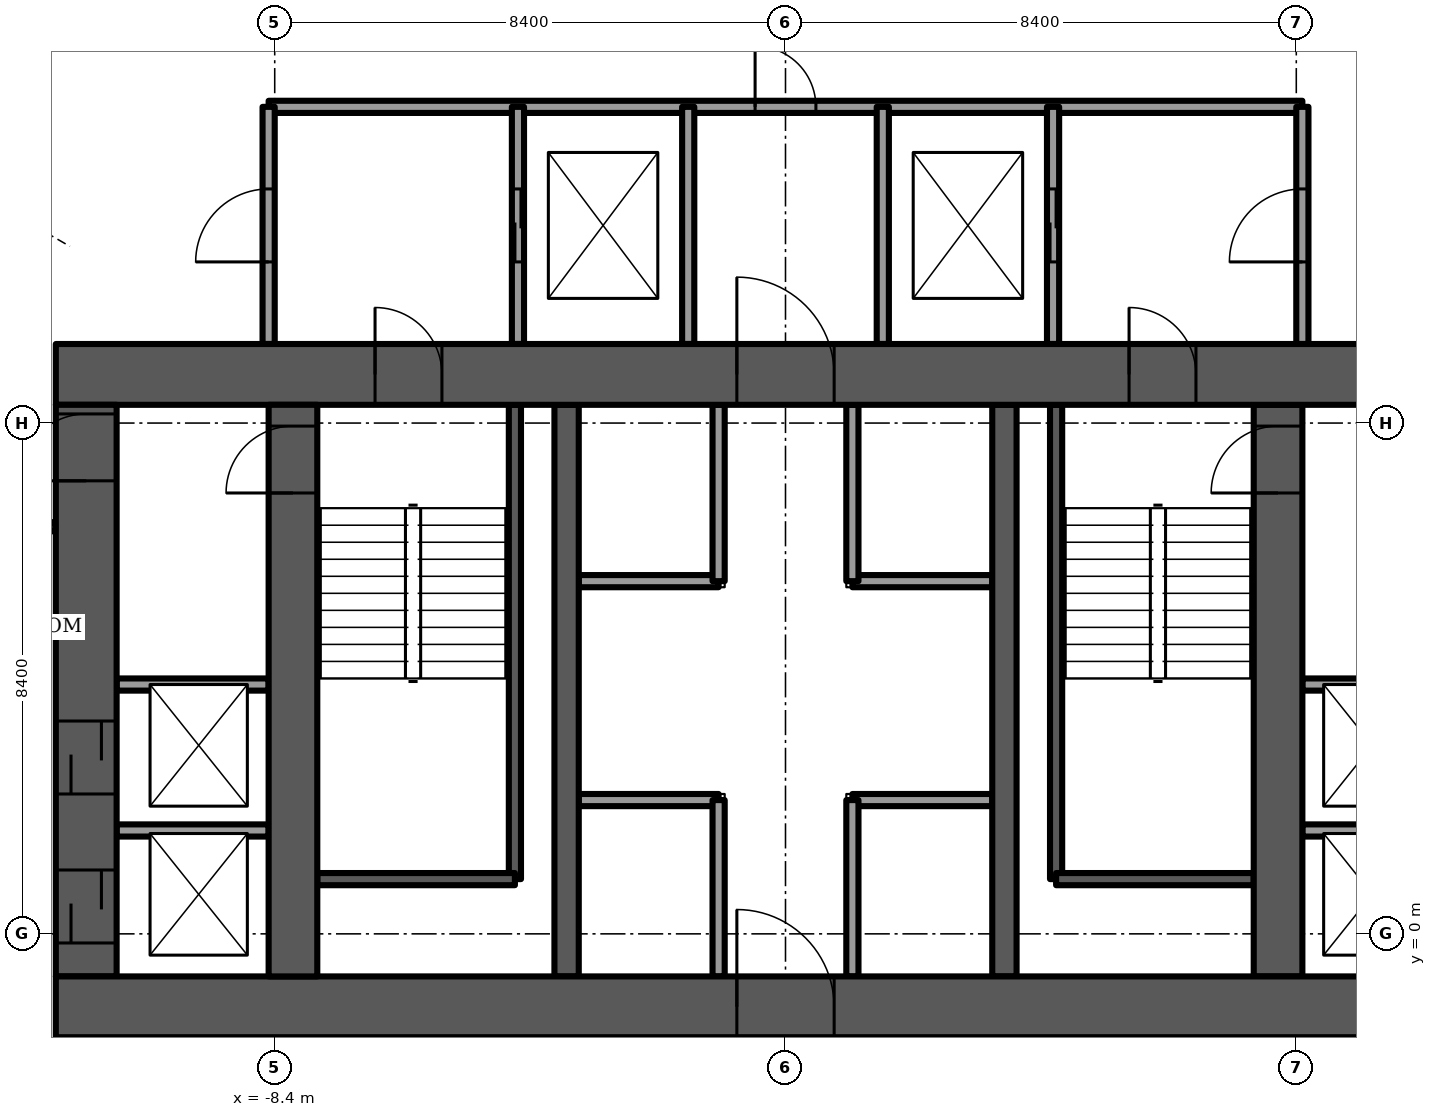
"""IFC4 building model, lengths in metres.
Left out: names, types, materials, properties, quantities, classifications, styles, units other than length and angle.
Written with IfcOpenShell. Run it as: python <this file> out.ifc"""

import sys

from ifc_helpers import new_model, si_unit, direction, frame, frame_2d, origin, place, context, subcontext, project, spatial, rectangle, extrude, element, fill, save


model = new_model("IFC4")
c1 = context("Model", 3, precision=1e-05, world=origin(), true_north=direction((0.0, 1.0)))
c2 = subcontext(c1, "Body", "Model", "MODEL_VIEW")
j1 = project(units=[si_unit("LENGTHUNIT", "METRE"), si_unit("PLANEANGLEUNIT", "RADIAN")], contexts=[c1])
p1 = place(None, origin())
s1 = spatial("IfcSite", under=j1, at=p1, CompositionType="ELEMENT")
p2 = place(p1, origin())
s2 = spatial("IfcBuilding", under=s1, at=p2, CompositionType="ELEMENT")
p3 = place(p2, frame((0.0, 0.0, 138.5)))
s3 = spatial("IfcBuildingStorey", under=s2, at=p3, CompositionType="ELEMENT", Elevation=138.5)
p4 = place(p3, frame((-12.0, -1.2, -0.3), z_axis=(0.0, 0.0, 1.0), x_axis=(1.0, 0.0, 0.0)))
e1 = element("IfcWall", 1, at=p4, inside=s3, PredefinedType="SHEAR", context=c2, shape_type="SweptSolid", body=[
    extrude(rectangle(XDim=24.0, YDim=1.0, at=frame_2d((12.0, 0.0))), origin(), (0.0, 0.0, 1.0), 3.75),
])
p5 = place(p4, frame((11.2, 0.0, 0.0)))
e2 = element("IfcOpeningElement", 2, at=p5, cuts=e1, PredefinedType="OPENING", context=c2, shape_type="SweptSolid", body=[
    extrude(rectangle(XDim=1.6, YDim=2.1, at=frame_2d((0.8, 1.05))), frame((0.0, 0.5, 0.0), z_axis=(0.0, -1.0, 0.0), x_axis=(1.0, 0.0, 0.0)), (0.0, 0.0, 1.0), 1.0),
])
p6 = place(p3, frame((-12.0, 9.2, -0.3), z_axis=(0.0, 0.0, 1.0), x_axis=(1.0, 0.0, 0.0)))
e3 = element("IfcWall", 3, at=p6, inside=s3, PredefinedType="SHEAR", context=c2, shape_type="SweptSolid", body=[
    extrude(rectangle(XDim=24.0, YDim=1.0, at=frame_2d((12.0, 0.0))), origin(), (0.0, 0.0, 1.0), 3.75),
])
p7 = place(p6, frame((11.2, 0.0, 0.0)))
e4 = element("IfcOpeningElement", 4, at=p7, cuts=e3, PredefinedType="OPENING", context=c2, shape_type="SweptSolid", body=[
    extrude(rectangle(XDim=1.6, YDim=2.1, at=frame_2d((0.8, 1.05))), frame((0.0, 0.5, 0.0), z_axis=(0.0, -1.0, 0.0), x_axis=(1.0, 0.0, 0.0)), (0.0, 0.0, 1.0), 1.0),
])
p8 = place(p6, frame((5.25, 0.0, 0.0)))
e5 = element("IfcOpeningElement", 5, at=p8, cuts=e3, PredefinedType="OPENING", context=c2, shape_type="SweptSolid", body=[
    extrude(rectangle(XDim=1.1, YDim=2.1, at=frame_2d((0.55, 1.05))), frame((0.0, 0.5, 0.0), z_axis=(0.0, -1.0, 0.0), x_axis=(1.0, 0.0, 0.0)), (0.0, 0.0, 1.0), 1.0),
])
p9 = place(p6, frame((17.65, 0.0, 0.0)))
e6 = element("IfcOpeningElement", 6, at=p9, cuts=e3, PredefinedType="OPENING", context=c2, shape_type="SweptSolid", body=[
    extrude(rectangle(XDim=1.1, YDim=2.1, at=frame_2d((0.55, 1.05))), frame((0.0, 0.5, 0.0), z_axis=(0.0, -1.0, 0.0), x_axis=(1.0, 0.0, 0.0)), (0.0, 0.0, 1.0), 1.0),
])
p10 = place(p3, frame((-8.1, -0.7, -0.3), z_axis=(0.0, 0.0, 1.0), x_axis=(0.0, 1.0, 0.0)))
e7 = element("IfcWall", 7, at=p10, inside=s3, PredefinedType="SHEAR", context=c2, shape_type="SweptSolid", body=[
    extrude(rectangle(XDim=9.4, YDim=0.8, at=frame_2d((4.7, 0.0))), origin(), (0.0, 0.0, 1.0), 3.75),
])
p11 = place(p10, frame((7.95, 0.0, 0.0)))
e8 = element("IfcOpeningElement", 8, at=p11, cuts=e7, PredefinedType="OPENING", context=c2, shape_type="SweptSolid", body=[
    extrude(rectangle(XDim=1.1, YDim=2.1, at=frame_2d((0.55, 1.05))), frame((0.0, 0.4, 0.0), z_axis=(0.0, -1.0, 0.0), x_axis=(1.0, 0.0, 0.0)), (0.0, 0.0, 1.0), 0.8),
])
p12 = place(p3, frame((8.1, -0.7, -0.3), z_axis=(0.0, 0.0, 1.0), x_axis=(0.0, 1.0, 0.0)))
e9 = element("IfcWall", 9, at=p12, inside=s3, PredefinedType="SHEAR", context=c2, shape_type="SweptSolid", body=[
    extrude(rectangle(XDim=9.4, YDim=0.8, at=frame_2d((4.7, 0.0))), origin(), (0.0, 0.0, 1.0), 3.75),
])
p13 = place(p12, frame((7.95, 0.0, 0.0)))
e10 = element("IfcOpeningElement", 10, at=p13, cuts=e9, PredefinedType="OPENING", context=c2, shape_type="SweptSolid", body=[
    extrude(rectangle(XDim=1.1, YDim=2.1, at=frame_2d((0.55, 1.05))), frame((0.0, 0.4, 0.0), z_axis=(0.0, -1.0, 0.0), x_axis=(1.0, 0.0, 0.0)), (0.0, 0.0, 1.0), 0.8),
])
for number, where, z_axis, x_axis in (
    (11, (-3.6, -0.7, -0.3), (0.0, 0.0, 1.0), (0.0, 1.0, 0.0)),
    (12, (3.6, -0.7, -0.3), (0.0, 0.0, 1.0), (0.0, 1.0, 0.0)),
):
    element("IfcWall", number, at=place(p3, frame(where, z_axis=z_axis, x_axis=x_axis)), inside=s3, PredefinedType="SHEAR", context=c2, shape_type="SweptSolid", body=[
        extrude(rectangle(XDim=9.4, YDim=0.4, at=frame_2d((4.7, 0.0))), origin(), (0.0, 0.0, 1.0), 3.75),
    ])
p14 = place(p3, frame((-11.5, -0.7, -0.3), z_axis=(0.0, 0.0, 1.0), x_axis=(0.0, 1.0, 0.0)))
e13 = element("IfcWall", 13, at=p14, inside=s3, PredefinedType="SHEAR", context=c2, shape_type="SweptSolid", body=[
    extrude(rectangle(XDim=9.4, YDim=1.0, at=frame_2d((4.7, 0.0))), origin(), (0.0, 0.0, 1.0), 3.75),
])
p15 = place(p14, frame((8.15, 0.0, 0.0)))
e14 = element("IfcOpeningElement", 14, at=p15, cuts=e13, PredefinedType="OPENING", context=c2, shape_type="SweptSolid", body=[
    extrude(rectangle(XDim=1.1, YDim=2.1, at=frame_2d((0.55, 1.05))), frame((0.0, 0.5, 0.0), z_axis=(0.0, -1.0, 0.0), x_axis=(1.0, 0.0, 0.0)), (0.0, 0.0, 1.0), 1.0),
])
p16 = place(p14, frame((0.55, 0.0, 0.0)))
e15 = element("IfcOpeningElement", 15, at=p16, cuts=e13, PredefinedType="OPENING", context=c2, shape_type="SweptSolid", body=[
    extrude(rectangle(XDim=1.2, YDim=2.1, at=frame_2d((0.6, 1.05))), frame((0.0, 0.5, 0.0), z_axis=(0.0, -1.0, 0.0), x_axis=(1.0, 0.0, 0.0)), (0.0, 0.0, 1.0), 1.0),
])
p17 = place(p14, frame((3.0, 0.0, 0.0)))
e16 = element("IfcOpeningElement", 16, at=p17, cuts=e13, PredefinedType="OPENING", context=c2, shape_type="SweptSolid", body=[
    extrude(rectangle(XDim=1.2, YDim=2.1, at=frame_2d((0.6, 1.05))), frame((0.0, 0.5, 0.0), z_axis=(0.0, -1.0, 0.0), x_axis=(1.0, 0.0, 0.0)), (0.0, 0.0, 1.0), 1.0),
])
p18 = place(p3, frame((-10.45, 19.286, 0.0), z_axis=(0.0, 0.0, 1.0), x_axis=(-0.499991127072, -0.866030526511, 0.0)))
e17 = element("IfcWall", 17, at=p18, inside=s3, PredefinedType="PARAPET", context=c2, shape_type="SweptSolid", body=[
    extrude(rectangle(XDim=7.001, YDim=0.9, at=frame_2d((3.5, 0.0))), origin(), (0.0, 0.0, 1.0), 1.1),
])
for number, where, z_axis, x_axis in (
    (18, (-3.4, 2.2, 0.0), (0.0, 0.0, 1.0), (1.0, 0.0, 0.0)),
    (19, (-3.4, 5.8, 0.0), (0.0, 0.0, 1.0), (1.0, 0.0, 0.0)),
    (20, (1.1, 2.2, 0.0), (0.0, 0.0, 1.0), (1.0, 0.0, 0.0)),
    (21, (1.1, 5.8, 0.0), (0.0, 0.0, 1.0), (1.0, 0.0, 0.0)),
):
    element("IfcWall", number, at=place(p3, frame(where, z_axis=z_axis, x_axis=x_axis)), inside=s3, PredefinedType="PARTITIONING", context=c2, shape_type="SweptSolid", body=[
        extrude(rectangle(XDim=2.3, YDim=0.2, at=frame_2d((1.15, 0.0))), origin(), (0.0, 0.0, 1.0), 3.45),
    ])
for number, where, z_axis, x_axis in (
    (22, (-1.1, -0.7, 0.0), (0.0, 0.0, 1.0), (0.0, 1.0, 0.0)),
    (23, (1.1, -0.7, 0.0), (0.0, 0.0, 1.0), (0.0, 1.0, 0.0)),
    (24, (-1.1, 5.8, 0.0), (0.0, 0.0, 1.0), (0.0, 1.0, 0.0)),
    (25, (1.1, 5.8, 0.0), (0.0, 0.0, 1.0), (0.0, 1.0, 0.0)),
):
    element("IfcWall", number, at=place(p3, frame(where, z_axis=z_axis, x_axis=x_axis)), inside=s3, PredefinedType="PARTITIONING", context=c2, shape_type="SweptSolid", body=[
        extrude(rectangle(XDim=2.9, YDim=0.2, at=frame_2d((1.45, 0.0))), origin(), (0.0, 0.0, 1.0), 3.45),
    ])
p19 = place(p3, frame((-4.45, 0.9, -0.3), z_axis=(0.0, 0.0, 1.0), x_axis=(0.0, 1.0, 0.0)))
e26 = element("IfcWall", 26, at=p19, inside=s3, PredefinedType="SOLIDWALL", context=c2, shape_type="SweptSolid", body=[
    extrude(rectangle(XDim=7.8, YDim=0.2, at=frame_2d((3.9, 0.0))), origin(), (0.0, 0.0, 1.0), 3.75),
])
p20 = place(p3, frame((-7.7, 0.9, -0.3), z_axis=(0.0, 0.0, 1.0), x_axis=(1.0, 0.0, 0.0)))
e27 = element("IfcWall", 27, at=p20, inside=s3, PredefinedType="SOLIDWALL", context=c2, shape_type="SweptSolid", body=[
    extrude(rectangle(XDim=3.25, YDim=0.2, at=frame_2d((1.625, 0.0))), origin(), (0.0, 0.0, 1.0), 3.75),
])
p21 = place(p3, frame((4.45, 0.9, -0.3), z_axis=(0.0, 0.0, 1.0), x_axis=(0.0, 1.0, 0.0)))
e28 = element("IfcWall", 28, at=p21, inside=s3, PredefinedType="SOLIDWALL", context=c2, shape_type="SweptSolid", body=[
    extrude(rectangle(XDim=7.8, YDim=0.2, at=frame_2d((3.9, 0.0))), origin(), (0.0, 0.0, 1.0), 3.75),
])
p22 = place(p3, frame((4.45, 0.9, -0.3), z_axis=(0.0, 0.0, 1.0), x_axis=(1.0, 0.0, 0.0)))
e29 = element("IfcWall", 29, at=p22, inside=s3, PredefinedType="SOLIDWALL", context=c2, shape_type="SweptSolid", body=[
    extrude(rectangle(XDim=3.25, YDim=0.2, at=frame_2d((1.625, 0.0))), origin(), (0.0, 0.0, 1.0), 3.75),
])
p23 = place(p3, frame((-8.5, 13.6, 0.0), z_axis=(0.0, 0.0, 1.0), x_axis=(1.0, 0.0, 0.0)))
e30 = element("IfcWall", 30, at=p23, inside=s3, PredefinedType="PARTITIONING", context=c2, shape_type="SweptSolid", body=[
    extrude(rectangle(XDim=17.0, YDim=0.2, at=frame_2d((8.5, 0.0))), origin(), (0.0, 0.0, 1.0), 3.45),
])
p24 = place(p23, frame((8.0, 0.0, 0.0)))
e31 = element("IfcOpeningElement", 31, at=p24, cuts=e30, PredefinedType="OPENING", context=c2, shape_type="SweptSolid", body=[
    extrude(rectangle(XDim=1.0, YDim=2.1, at=frame_2d((0.5, 1.05))), frame((0.0, 0.1, 0.0), z_axis=(0.0, -1.0, 0.0), x_axis=(1.0, 0.0, 0.0)), (0.0, 0.0, 1.0), 0.2),
])
p25 = place(p3, frame((-8.5, 9.7, 0.0), z_axis=(0.0, 0.0, 1.0), x_axis=(0.0, 1.0, 0.0)))
e32 = element("IfcWall", 32, at=p25, inside=s3, PredefinedType="PARTITIONING", context=c2, shape_type="SweptSolid", body=[
    extrude(rectangle(XDim=3.9, YDim=0.2, at=frame_2d((1.95, 0.0))), origin(), (0.0, 0.0, 1.0), 3.45),
])
p26 = place(p25, frame((1.35, 0.0, 0.0)))
e33 = element("IfcOpeningElement", 33, at=p26, cuts=e32, PredefinedType="OPENING", context=c2, shape_type="SweptSolid", body=[
    extrude(rectangle(XDim=1.2, YDim=2.1, at=frame_2d((0.6, 1.05))), frame((0.0, 0.1, 0.0), z_axis=(0.0, -1.0, 0.0), x_axis=(1.0, 0.0, 0.0)), (0.0, 0.0, 1.0), 0.2),
])
p27 = place(p3, frame((8.5, 9.7, 0.0), z_axis=(0.0, 0.0, 1.0), x_axis=(0.0, 1.0, 0.0)))
e34 = element("IfcWall", 34, at=p27, inside=s3, PredefinedType="PARTITIONING", context=c2, shape_type="SweptSolid", body=[
    extrude(rectangle(XDim=3.9, YDim=0.2, at=frame_2d((1.95, 0.0))), origin(), (0.0, 0.0, 1.0), 3.45),
])
p28 = place(p27, frame((1.35, 0.0, 0.0)))
e35 = element("IfcOpeningElement", 35, at=p28, cuts=e34, PredefinedType="OPENING", context=c2, shape_type="SweptSolid", body=[
    extrude(rectangle(XDim=1.2, YDim=2.1, at=frame_2d((0.6, 1.05))), frame((0.0, 0.1, 0.0), z_axis=(0.0, -1.0, 0.0), x_axis=(1.0, 0.0, 0.0)), (0.0, 0.0, 1.0), 0.2),
])
p29 = place(p3, frame((-4.4, 9.7, 0.0), z_axis=(0.0, 0.0, 1.0), x_axis=(0.0, 1.0, 0.0)))
e36 = element("IfcWall", 36, at=p29, inside=s3, PredefinedType="PARTITIONING", context=c2, shape_type="SweptSolid", body=[
    extrude(rectangle(XDim=3.9, YDim=0.2, at=frame_2d((1.95, 0.0))), origin(), (0.0, 0.0, 1.0), 3.45),
])
p30 = place(p29, frame((1.35, 0.0, 0.0)))
e37 = element("IfcOpeningElement", 37, at=p30, cuts=e36, PredefinedType="OPENING", context=c2, shape_type="SweptSolid", body=[
    extrude(rectangle(XDim=1.2, YDim=2.1, at=frame_2d((0.6, 1.05))), frame((0.0, 0.1, 0.0), z_axis=(0.0, -1.0, 0.0), x_axis=(1.0, 0.0, 0.0)), (0.0, 0.0, 1.0), 0.2),
])
p31 = place(p3, frame((4.4, 9.7, 0.0), z_axis=(0.0, 0.0, 1.0), x_axis=(0.0, 1.0, 0.0)))
e38 = element("IfcWall", 38, at=p31, inside=s3, PredefinedType="PARTITIONING", context=c2, shape_type="SweptSolid", body=[
    extrude(rectangle(XDim=3.9, YDim=0.2, at=frame_2d((1.95, 0.0))), origin(), (0.0, 0.0, 1.0), 3.45),
])
p32 = place(p31, frame((1.35, 0.0, 0.0)))
e39 = element("IfcOpeningElement", 39, at=p32, cuts=e38, PredefinedType="OPENING", context=c2, shape_type="SweptSolid", body=[
    extrude(rectangle(XDim=1.2, YDim=2.1, at=frame_2d((0.6, 1.05))), frame((0.0, 0.1, 0.0), z_axis=(0.0, -1.0, 0.0), x_axis=(1.0, 0.0, 0.0)), (0.0, 0.0, 1.0), 0.2),
])
for number, where, z_axis, x_axis in (
    (40, (-1.6, 9.7, 0.0), (0.0, 0.0, 1.0), (0.0, 1.0, 0.0)),
    (41, (1.6, 9.7, 0.0), (0.0, 0.0, 1.0), (0.0, 1.0, 0.0)),
):
    element("IfcWall", number, at=place(p3, frame(where, z_axis=z_axis, x_axis=x_axis)), inside=s3, PredefinedType="PARTITIONING", context=c2, shape_type="SweptSolid", body=[
        extrude(rectangle(XDim=3.9, YDim=0.2, at=frame_2d((1.95, 0.0))), origin(), (0.0, 0.0, 1.0), 3.45),
    ])
for number, where, z_axis, x_axis in (
    (42, (-11.0, 1.7, 0.0), (0.0, 0.0, 1.0), (1.0, 0.0, 0.0)),
    (43, (-11.0, 4.1, 0.0), (0.0, 0.0, 1.0), (1.0, 0.0, 0.0)),
    (44, (8.5, 1.7, 0.0), (0.0, 0.0, 1.0), (1.0, 0.0, 0.0)),
    (45, (8.5, 4.1, 0.0), (0.0, 0.0, 1.0), (1.0, 0.0, 0.0)),
):
    element("IfcWall", number, at=place(p3, frame(where, z_axis=z_axis, x_axis=x_axis)), inside=s3, PredefinedType="PARTITIONING", context=c2, shape_type="SweptSolid", body=[
        extrude(rectangle(XDim=2.5, YDim=0.2, at=frame_2d((1.25, 0.0))), origin(), (0.0, 0.0, 1.0), 3.45),
    ])
p33 = place(p3, frame((-13.44, 6.695, 0.0), z_axis=(0.0, 0.0, 1.0), x_axis=(1.0, 0.0, 0.0)))
e46 = element("IfcWall", 46, at=p33, inside=s3, PredefinedType="PARTITIONING", context=c2, shape_type="SweptSolid", body=[
    extrude(rectangle(XDim=1.43, YDim=0.15, at=frame_2d((0.715, 0.0))), origin(), (0.0, 0.0, 1.0), 3.45),
])
p34 = place(p5, origin())
e47 = element("IfcDoor", 47, at=p34, inside=s3, OperationType="DOUBLE_DOOR_SINGLE_SWING", PredefinedType="DOOR", context=c2, shape_type="SweptSolid", body=[
    extrude(rectangle(XDim=1.6, YDim=2.1, at=frame_2d((0.8, 1.05))), frame((0.0, 0.025, 0.0), z_axis=(0.0, -1.0, 0.0), x_axis=(1.0, 0.0, 0.0)), (0.0, 0.0, 1.0), 0.05),
])
fill(e2, e47)
p35 = place(p7, origin())
e48 = element("IfcDoor", 48, at=p35, inside=s3, OperationType="DOUBLE_DOOR_SINGLE_SWING", PredefinedType="DOOR", context=c2, shape_type="SweptSolid", body=[
    extrude(rectangle(XDim=1.6, YDim=2.1, at=frame_2d((0.8, 1.05))), frame((0.0, 0.025, 0.0), z_axis=(0.0, -1.0, 0.0), x_axis=(1.0, 0.0, 0.0)), (0.0, 0.0, 1.0), 0.05),
])
fill(e4, e48)
p36 = place(p8, origin())
e49 = element("IfcDoor", 49, at=p36, inside=s3, OperationType="SINGLE_SWING_LEFT", PredefinedType="DOOR", context=c2, shape_type="SweptSolid", body=[
    extrude(rectangle(XDim=1.1, YDim=2.1, at=frame_2d((0.55, 1.05))), frame((0.0, 0.025, 0.0), z_axis=(0.0, -1.0, 0.0), x_axis=(1.0, 0.0, 0.0)), (0.0, 0.0, 1.0), 0.05),
])
fill(e5, e49)
p37 = place(p11, origin())
e50 = element("IfcDoor", 50, at=p37, inside=s3, OperationType="SINGLE_SWING_RIGHT", PredefinedType="DOOR", context=c2, shape_type="SweptSolid", body=[
    extrude(rectangle(XDim=1.1, YDim=2.1, at=frame_2d((0.55, 1.05))), frame((0.0, 0.025, 0.0), z_axis=(0.0, -1.0, 0.0), x_axis=(1.0, 0.0, 0.0)), (0.0, 0.0, 1.0), 0.05),
])
fill(e8, e50)
p38 = place(p9, origin())
e51 = element("IfcDoor", 51, at=p38, inside=s3, OperationType="SINGLE_SWING_RIGHT", PredefinedType="DOOR", context=c2, shape_type="SweptSolid", body=[
    extrude(rectangle(XDim=1.1, YDim=2.1, at=frame_2d((0.55, 1.05))), frame((0.0, 0.025, 0.0), z_axis=(0.0, -1.0, 0.0), x_axis=(1.0, 0.0, 0.0)), (0.0, 0.0, 1.0), 0.05),
])
fill(e6, e51)
p39 = place(p13, origin())
e52 = element("IfcDoor", 52, at=p39, inside=s3, OperationType="SINGLE_SWING_LEFT", PredefinedType="DOOR", context=c2, shape_type="SweptSolid", body=[
    extrude(rectangle(XDim=1.1, YDim=2.1, at=frame_2d((0.55, 1.05))), frame((0.0, 0.025, 0.0), z_axis=(0.0, -1.0, 0.0), x_axis=(1.0, 0.0, 0.0)), (0.0, 0.0, 1.0), 0.05),
])
fill(e10, e52)
p40 = place(p30, origin())
e53 = element("IfcDoor", 53, at=p40, inside=s3, OperationType="SLIDING_TO_LEFT", PredefinedType="DOOR", context=c2, shape_type="SweptSolid", body=[
    extrude(rectangle(XDim=1.2, YDim=2.1, at=frame_2d((0.6, 1.05))), frame((0.0, 0.025, 0.0), z_axis=(0.0, -1.0, 0.0), x_axis=(1.0, 0.0, 0.0)), (0.0, 0.0, 1.0), 0.05),
])
fill(e37, e53)
p41 = place(p26, origin())
e54 = element("IfcDoor", 54, at=p41, inside=s3, OperationType="SINGLE_SWING_LEFT", PredefinedType="DOOR", context=c2, shape_type="SweptSolid", body=[
    extrude(rectangle(XDim=1.2, YDim=2.1, at=frame_2d((0.6, 1.05))), frame((0.0, 0.025, 0.0), z_axis=(0.0, -1.0, 0.0), x_axis=(1.0, 0.0, 0.0)), (0.0, 0.0, 1.0), 0.05),
])
fill(e33, e54)
p42 = place(p32, origin())
e55 = element("IfcDoor", 55, at=p42, inside=s3, OperationType="SLIDING_TO_LEFT", PredefinedType="DOOR", context=c2, shape_type="SweptSolid", body=[
    extrude(rectangle(XDim=1.2, YDim=2.1, at=frame_2d((0.6, 1.05))), frame((0.0, 0.025, 0.0), z_axis=(0.0, -1.0, 0.0), x_axis=(1.0, 0.0, 0.0)), (0.0, 0.0, 1.0), 0.05),
])
fill(e39, e55)
p43 = place(p28, origin())
e56 = element("IfcDoor", 56, at=p43, inside=s3, OperationType="SINGLE_SWING_LEFT", PredefinedType="DOOR", context=c2, shape_type="SweptSolid", body=[
    extrude(rectangle(XDim=1.2, YDim=2.1, at=frame_2d((0.6, 1.05))), frame((0.0, 0.025, 0.0), z_axis=(0.0, -1.0, 0.0), x_axis=(1.0, 0.0, 0.0)), (0.0, 0.0, 1.0), 0.05),
])
fill(e35, e56)
p44 = place(p24, origin())
e57 = element("IfcDoor", 57, at=p44, inside=s3, OperationType="SINGLE_SWING_LEFT", PredefinedType="DOOR", context=c2, shape_type="SweptSolid", body=[
    extrude(rectangle(XDim=1.0, YDim=2.1, at=frame_2d((0.5, 1.05))), frame((0.0, 0.025, 0.0), z_axis=(0.0, -1.0, 0.0), x_axis=(1.0, 0.0, 0.0)), (0.0, 0.0, 1.0), 0.05),
])
fill(e31, e57)
p45 = place(p15, origin())
e58 = element("IfcDoor", 58, at=p45, inside=s3, OperationType="SINGLE_SWING_LEFT", PredefinedType="DOOR", context=c2, shape_type="SweptSolid", body=[
    extrude(rectangle(XDim=1.1, YDim=2.1, at=frame_2d((0.55, 1.05))), frame((0.0, 0.025, 0.0), z_axis=(0.0, -1.0, 0.0), x_axis=(1.0, 0.0, 0.0)), (0.0, 0.0, 1.0), 0.05),
])
fill(e14, e58)
p46 = place(p16, origin())
e59 = element("IfcDoor", 59, at=p46, inside=s3, OperationType="SLIDING_TO_LEFT", PredefinedType="DOOR", context=c2, shape_type="SweptSolid", body=[
    extrude(rectangle(XDim=1.2, YDim=2.1, at=frame_2d((0.6, 1.05))), frame((0.0, 0.025, 0.0), z_axis=(0.0, -1.0, 0.0), x_axis=(1.0, 0.0, 0.0)), (0.0, 0.0, 1.0), 0.05),
])
fill(e15, e59)
p47 = place(p17, origin())
e60 = element("IfcDoor", 60, at=p47, inside=s3, OperationType="SLIDING_TO_LEFT", PredefinedType="DOOR", context=c2, shape_type="SweptSolid", body=[
    extrude(rectangle(XDim=1.2, YDim=2.1, at=frame_2d((0.6, 1.05))), frame((0.0, 0.025, 0.0), z_axis=(0.0, -1.0, 0.0), x_axis=(1.0, 0.0, 0.0)), (0.0, 0.0, 1.0), 0.05),
])
fill(e16, e60)
save(model, sys.argv[1])
